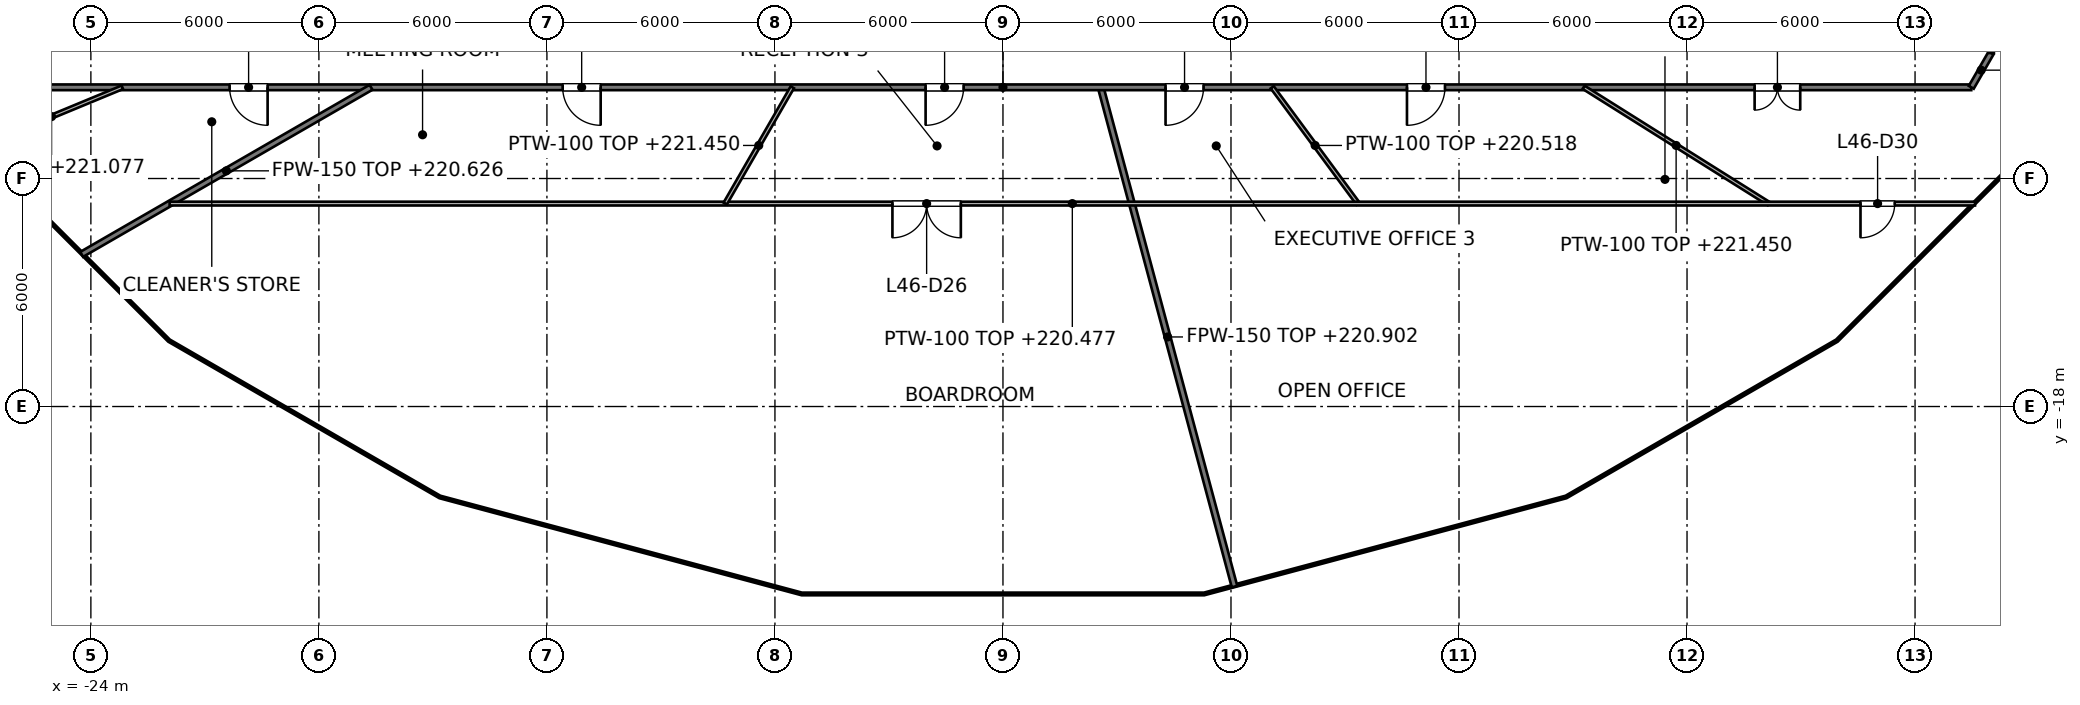
"""IFC4 building model, lengths in metres.
Left out: names, types, materials, properties, quantities, classifications, styles, units other than length and angle.
Written with IfcOpenShell. Run it as: python <this file> out.ifc"""

import sys

from ifc_helpers import new_model, si_unit, direction, frame, frame_2d, origin, place, context, subcontext, project, spatial, rectangle, extrude, element, fill, save


model = new_model("IFC4")
c1 = context("Model", 3, precision=1e-05, world=origin(), true_north=direction((0.0, 1.0)))
c2 = subcontext(c1, "Body", "Model", "MODEL_VIEW")
j1 = project(units=[si_unit("LENGTHUNIT", "METRE"), si_unit("PLANEANGLEUNIT", "RADIAN")], contexts=[c1])
p1 = place(None, origin())
s1 = spatial("IfcSite", under=j1, at=p1, CompositionType="ELEMENT")
p2 = place(p1, origin())
s2 = spatial("IfcBuilding", under=s1, at=p2, CompositionType="ELEMENT")
p3 = place(p2, frame((0.0, 0.0, 217.6)))
s3 = spatial("IfcBuildingStorey", under=s2, at=p3, CompositionType="ELEMENT", Elevation=217.6)
p4 = place(p3, frame((2.572, -9.6, 0.0), z_axis=(0.0, 0.0, 1.0), x_axis=(0.258848824381, -0.965917846464, 0.0)))
e1 = element("IfcWall", 1, at=p4, inside=s3, PredefinedType="PARTITIONING", context=c2, shape_type="SweptSolid", body=[
    extrude(rectangle(XDim=13.603, YDim=0.15, at=frame_2d((6.801, 0.0))), origin(), (0.0, 0.0, 1.0), 3.302),
])
p5 = place(p3, frame((-25.479, -9.6, 0.0), z_axis=(0.0, 0.0, 1.0), x_axis=(1.0, 0.0, 0.0)))
e2 = element("IfcWall", 2, at=p5, inside=s3, PredefinedType="PARTITIONING", context=c2, shape_type="SweptSolid", body=[
    extrude(rectangle(XDim=50.958, YDim=0.15, at=frame_2d((25.479, 0.0))), origin(), (0.0, 0.0, 1.0), 2.877),
])
p6 = place(p5, frame((5.129, 0.0, 0.0)))
e3 = element("IfcOpeningElement", 3, at=p6, cuts=e2, PredefinedType="OPENING", context=c2, shape_type="SweptSolid", body=[
    extrude(rectangle(XDim=1.0, YDim=2.1, at=frame_2d((0.5, 1.05))), frame((0.0, 0.075, 0.0), z_axis=(0.0, -1.0, 0.0), x_axis=(1.0, 0.0, 0.0)), (0.0, 0.0, 1.0), 0.15),
])
p7 = place(p5, frame((13.894, 0.0, 0.0)))
e4 = element("IfcOpeningElement", 4, at=p7, cuts=e2, PredefinedType="OPENING", context=c2, shape_type="SweptSolid", body=[
    extrude(rectangle(XDim=1.0, YDim=2.1, at=frame_2d((0.5, 1.05))), frame((0.0, 0.075, 0.0), z_axis=(0.0, -1.0, 0.0), x_axis=(1.0, 0.0, 0.0)), (0.0, 0.0, 1.0), 0.15),
])
p8 = place(p5, frame((23.443, 0.0, 0.0)))
e5 = element("IfcOpeningElement", 5, at=p8, cuts=e2, PredefinedType="OPENING", context=c2, shape_type="SweptSolid", body=[
    extrude(rectangle(XDim=1.0, YDim=2.1, at=frame_2d((0.5, 1.05))), frame((0.0, 0.075, 0.0), z_axis=(0.0, -1.0, 0.0), x_axis=(1.0, 0.0, 0.0)), (0.0, 0.0, 1.0), 0.15),
])
p9 = place(p5, frame((29.757, 0.0, 0.0)))
e6 = element("IfcOpeningElement", 6, at=p9, cuts=e2, PredefinedType="OPENING", context=c2, shape_type="SweptSolid", body=[
    extrude(rectangle(XDim=1.0, YDim=2.1, at=frame_2d((0.5, 1.05))), frame((0.0, 0.075, 0.0), z_axis=(0.0, -1.0, 0.0), x_axis=(1.0, 0.0, 0.0)), (0.0, 0.0, 1.0), 0.15),
])
p10 = place(p5, frame((36.11, 0.0, 0.0)))
e7 = element("IfcOpeningElement", 7, at=p10, cuts=e2, PredefinedType="OPENING", context=c2, shape_type="SweptSolid", body=[
    extrude(rectangle(XDim=1.0, YDim=2.1, at=frame_2d((0.5, 1.05))), frame((0.0, 0.075, 0.0), z_axis=(0.0, -1.0, 0.0), x_axis=(1.0, 0.0, 0.0)), (0.0, 0.0, 1.0), 0.15),
])
p11 = place(p5, frame((45.258, 0.0, 0.0)))
e8 = element("IfcOpeningElement", 8, at=p11, cuts=e2, PredefinedType="OPENING", context=c2, shape_type="SweptSolid", body=[
    extrude(rectangle(XDim=1.2, YDim=2.1, at=frame_2d((0.6, 1.05))), frame((0.0, 0.075, 0.0), z_axis=(0.0, -1.0, 0.0), x_axis=(1.0, 0.0, 0.0)), (0.0, 0.0, 1.0), 0.15),
])
p12 = place(p3, frame((-24.242, -13.996, 0.0), z_axis=(0.0, 0.0, 1.0), x_axis=(0.86602327363, 0.500003689518, 0.0)))
e9 = element("IfcWall", 9, at=p12, inside=s3, PredefinedType="PARTITIONING", context=c2, shape_type="SweptSolid", body=[
    extrude(rectangle(XDim=8.792, YDim=0.15, at=frame_2d((4.396, 0.0))), origin(), (0.0, 0.0, 1.0), 3.026),
])
p13 = place(p3, frame((25.479, -9.6, 0.0), z_axis=(0.0, 0.0, 1.0), x_axis=(0.499715696113, 0.8661894845, 0.0)))
e10 = element("IfcWall", 10, at=p13, inside=s3, PredefinedType="PARTITIONING", context=c2, shape_type="SweptSolid", body=[
    extrude(rectangle(XDim=1.042, YDim=0.15, at=frame_2d((0.521, 0.0))), origin(), (0.0, 0.0, 1.0), 2.927),
])
p14 = place(p3, frame((26.0, -8.697, 0.0), z_axis=(0.0, 0.0, 1.0), x_axis=(0.0, 1.0, 0.0)))
e11 = element("IfcWall", 11, at=p14, inside=s3, PredefinedType="PARTITIONING", context=c2, shape_type="SweptSolid", body=[
    extrude(rectangle(XDim=1.897, YDim=0.15, at=frame_2d((0.948, 0.0))), origin(), (0.0, 0.0, 1.0), 2.927),
])
p15 = place(p3, frame((7.085, -9.6, 0.0), z_axis=(0.0, 0.0, 1.0), x_axis=(0.593787976906, -0.80462154985, 0.0)))
e12 = element("IfcWall", 12, at=p15, inside=s3, PredefinedType="PARTITIONING", context=c2, shape_type="SweptSolid", body=[
    extrude(rectangle(XDim=3.803, YDim=0.1, at=frame_2d((1.901, 0.0))), origin(), (0.0, 0.0, 1.0), 2.918),
])
p16 = place(p3, frame((15.278, -9.6, 0.0), z_axis=(0.0, 0.0, 1.0), x_axis=(0.84673434941, -0.532015922252, 0.0)))
e13 = element("IfcWall", 13, at=p16, inside=s3, PredefinedType="PARTITIONING", context=c2, shape_type="SweptSolid", body=[
    extrude(rectangle(XDim=5.751, YDim=0.1, at=frame_2d((2.876, 0.0))), origin(), (0.0, 0.0, 1.0), 3.85),
])
p17 = place(p3, frame((-21.928, -12.66, 0.0), z_axis=(0.0, 0.0, 1.0), x_axis=(1.0, 0.0, 0.0)))
e14 = element("IfcWall", 14, at=p17, inside=s3, PredefinedType="PARTITIONING", context=c2, shape_type="SweptSolid", body=[
    extrude(rectangle(XDim=47.506, YDim=0.1, at=frame_2d((23.753, 0.0))), origin(), (0.0, 0.0, 1.0), 2.877),
])
p18 = place(p17, frame((19.02, 0.0, 0.0)))
e15 = element("IfcOpeningElement", 15, at=p18, cuts=e14, PredefinedType="OPENING", context=c2, shape_type="SweptSolid", body=[
    extrude(rectangle(XDim=1.8, YDim=2.1, at=frame_2d((0.9, 1.05))), frame((0.0, 0.05, 0.0), z_axis=(0.0, -1.0, 0.0), x_axis=(1.0, 0.0, 0.0)), (0.0, 0.0, 1.0), 0.1),
])
p19 = place(p17, frame((44.492, 0.0, 0.0)))
e16 = element("IfcOpeningElement", 16, at=p19, cuts=e14, PredefinedType="OPENING", context=c2, shape_type="SweptSolid", body=[
    extrude(rectangle(XDim=0.9, YDim=2.1, at=frame_2d((0.45, 1.05))), frame((0.0, 0.05, 0.0), z_axis=(0.0, -1.0, 0.0), x_axis=(1.0, 0.0, 0.0)), (0.0, 0.0, 1.0), 0.1),
])
p20 = place(p3, frame((-26.897, -11.143, 0.0), z_axis=(0.0, 0.0, 1.0), x_axis=(0.923872174496, 0.382701195701, 0.0)))
e17 = element("IfcWall", 17, at=p20, inside=s3, PredefinedType="PARTITIONING", context=c2, shape_type="SweptSolid", body=[
    extrude(rectangle(XDim=4.032, YDim=0.1, at=frame_2d((2.016, 0.0))), origin(), (0.0, 0.0, 1.0), 3.477),
])
p21 = place(p3, frame((-7.309, -12.66, 0.0), z_axis=(0.0, 0.0, 1.0), x_axis=(0.499899920428, 0.866083177042, 0.0)))
e18 = element("IfcWall", 18, at=p21, inside=s3, PredefinedType="PARTITIONING", context=c2, shape_type="SweptSolid", body=[
    extrude(rectangle(XDim=3.533, YDim=0.1, at=frame_2d((1.767, 0.0))), origin(), (0.0, 0.0, 1.0), 3.85),
])
p22 = place(p6, origin())
e19 = element("IfcDoor", 19, at=p22, inside=s3, OperationType="SINGLE_SWING_RIGHT", PredefinedType="DOOR", context=c2, shape_type="SweptSolid", body=[
    extrude(rectangle(XDim=1.0, YDim=2.1, at=frame_2d((0.5, 1.05))), frame((0.0, 0.025, 0.0), z_axis=(0.0, -1.0, 0.0), x_axis=(1.0, 0.0, 0.0)), (0.0, 0.0, 1.0), 0.05),
])
fill(e3, e19)
p23 = place(p7, origin())
e20 = element("IfcDoor", 20, at=p23, inside=s3, OperationType="SINGLE_SWING_RIGHT", PredefinedType="DOOR", context=c2, shape_type="SweptSolid", body=[
    extrude(rectangle(XDim=1.0, YDim=2.1, at=frame_2d((0.5, 1.05))), frame((0.0, 0.025, 0.0), z_axis=(0.0, -1.0, 0.0), x_axis=(1.0, 0.0, 0.0)), (0.0, 0.0, 1.0), 0.05),
])
fill(e4, e20)
p24 = place(p8, origin())
e21 = element("IfcDoor", 21, at=p24, inside=s3, OperationType="SINGLE_SWING_LEFT", PredefinedType="DOOR", context=c2, shape_type="SweptSolid", body=[
    extrude(rectangle(XDim=1.0, YDim=2.1, at=frame_2d((0.5, 1.05))), frame((0.0, 0.025, 0.0), z_axis=(0.0, -1.0, 0.0), x_axis=(1.0, 0.0, 0.0)), (0.0, 0.0, 1.0), 0.05),
])
fill(e5, e21)
p25 = place(p18, origin())
e22 = element("IfcDoor", 22, at=p25, inside=s3, OperationType="DOUBLE_DOOR_SINGLE_SWING", PredefinedType="DOOR", context=c2, shape_type="SweptSolid", body=[
    extrude(rectangle(XDim=1.8, YDim=2.1, at=frame_2d((0.9, 1.05))), frame((0.0, 0.025, 0.0), z_axis=(0.0, -1.0, 0.0), x_axis=(1.0, 0.0, 0.0)), (0.0, 0.0, 1.0), 0.05),
])
fill(e15, e22)
p26 = place(p9, origin())
e23 = element("IfcDoor", 23, at=p26, inside=s3, OperationType="SINGLE_SWING_LEFT", PredefinedType="DOOR", context=c2, shape_type="SweptSolid", body=[
    extrude(rectangle(XDim=1.0, YDim=2.1, at=frame_2d((0.5, 1.05))), frame((0.0, 0.025, 0.0), z_axis=(0.0, -1.0, 0.0), x_axis=(1.0, 0.0, 0.0)), (0.0, 0.0, 1.0), 0.05),
])
fill(e6, e23)
p27 = place(p10, origin())
e24 = element("IfcDoor", 24, at=p27, inside=s3, OperationType="SINGLE_SWING_LEFT", PredefinedType="DOOR", context=c2, shape_type="SweptSolid", body=[
    extrude(rectangle(XDim=1.0, YDim=2.1, at=frame_2d((0.5, 1.05))), frame((0.0, 0.025, 0.0), z_axis=(0.0, -1.0, 0.0), x_axis=(1.0, 0.0, 0.0)), (0.0, 0.0, 1.0), 0.05),
])
fill(e7, e24)
p28 = place(p11, origin())
e25 = element("IfcDoor", 25, at=p28, inside=s3, OperationType="DOUBLE_DOOR_SINGLE_SWING", PredefinedType="DOOR", context=c2, shape_type="SweptSolid", body=[
    extrude(rectangle(XDim=1.2, YDim=2.1, at=frame_2d((0.6, 1.05))), frame((0.0, 0.025, 0.0), z_axis=(0.0, -1.0, 0.0), x_axis=(1.0, 0.0, 0.0)), (0.0, 0.0, 1.0), 0.05),
])
fill(e8, e25)
p29 = place(p19, origin())
e26 = element("IfcDoor", 26, at=p29, inside=s3, OperationType="SINGLE_SWING_LEFT", PredefinedType="DOOR", context=c2, shape_type="SweptSolid", body=[
    extrude(rectangle(XDim=0.9, YDim=2.1, at=frame_2d((0.45, 1.05))), frame((0.0, 0.025, 0.0), z_axis=(0.0, -1.0, 0.0), x_axis=(1.0, 0.0, 0.0)), (0.0, 0.0, 1.0), 0.05),
])
fill(e16, e26)
save(model, sys.argv[1])
